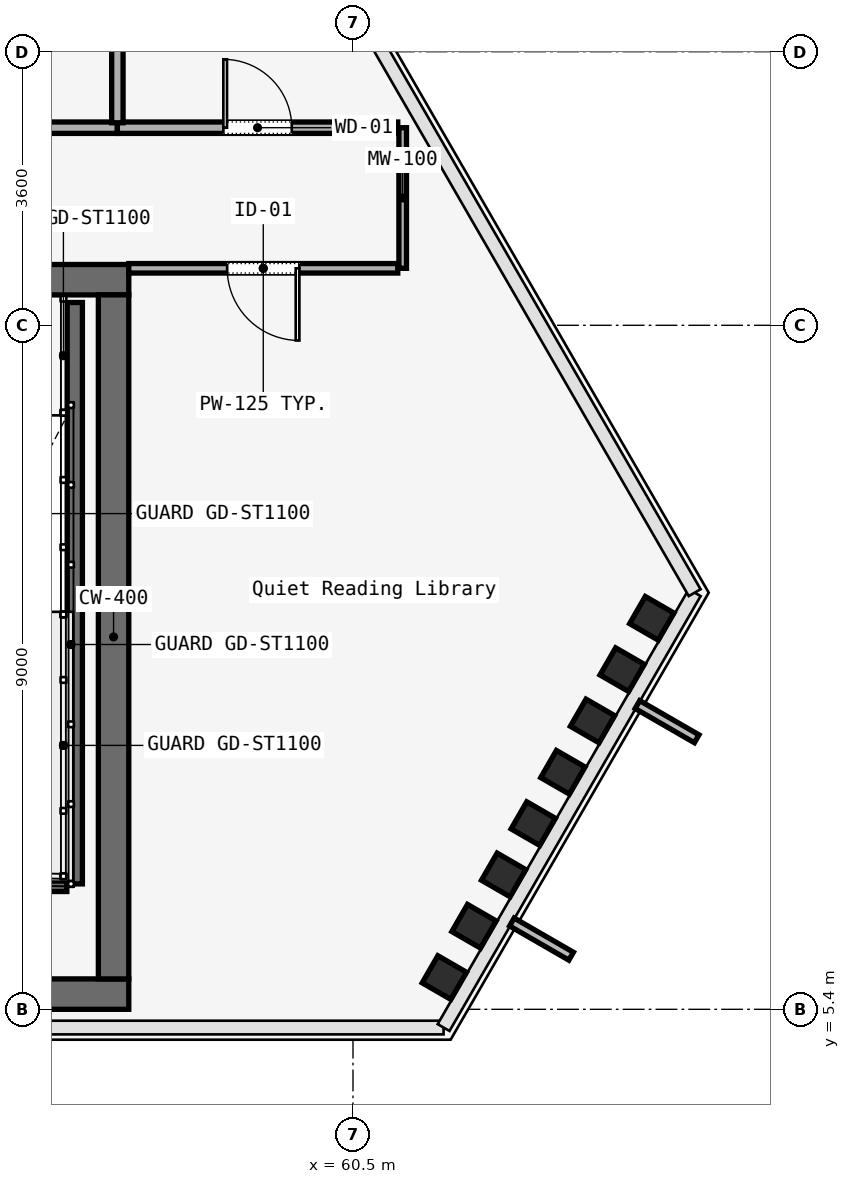
"""IFC4 building model, lengths in metres.
Left out: names, types, materials, properties, quantities, classifications, styles, units other than length and angle.
Written with IfcOpenShell. Run it as: python <this file> out.ifc"""

import sys

from ifc_helpers import new_model, si_unit, direction, frame, frame_2d, origin, origin_2d, place, context, subcontext, project, spatial, rectangle, i_section, extrude, element, fill, save


model = new_model("IFC4")
c1 = context("Model", 3, precision=1e-05, world=origin(), true_north=direction((0.0, 1.0)))
c2 = subcontext(c1, "Body", "Model", "MODEL_VIEW")
j1 = project(units=[si_unit("LENGTHUNIT", "METRE"), si_unit("PLANEANGLEUNIT", "RADIAN")], contexts=[c1])
p1 = place(None, origin())
s1 = spatial("IfcSite", under=j1, at=p1, CompositionType="ELEMENT")
p2 = place(p1, origin())
s2 = spatial("IfcBuilding", under=s1, at=p2, CompositionType="ELEMENT")
p3 = place(p2, frame((0.0, 0.0, 248.4)))
s3 = spatial("IfcBuildingStorey", under=s2, at=p3, CompositionType="ELEMENT", Elevation=248.4)
p4 = place(p3, frame((26.45, 15.0, 0.0), z_axis=(0.0, 0.0, 1.0), x_axis=(1.0, 0.0, 0.0)))
e1 = element("IfcWall", 1, at=p4, inside=s3, PredefinedType="SOLIDWALL", context=c2, shape_type="SweptSolid", body=[
    extrude(rectangle(XDim=31.1, YDim=0.4, at=frame_2d((15.55, 0.0))), origin(), (0.0, 0.0, 1.0), 3.58),
])
p5 = place(p4, frame((1.65, 0.0, 0.0)))
e2 = element("IfcOpeningElement", 2, at=p5, cuts=e1, PredefinedType="OPENING", context=c2, shape_type="SweptSolid", body=[
    extrude(rectangle(XDim=1.1, YDim=2.2, at=frame_2d((0.55, 1.1))), frame((0.0, 0.2, 0.0), z_axis=(0.0, -1.0, 0.0), x_axis=(1.0, 0.0, 0.0)), (0.0, 0.0, 1.0), 0.4),
])
p6 = place(p4, frame((13.65, 0.0, 0.0)))
e3 = element("IfcOpeningElement", 3, at=p6, cuts=e1, PredefinedType="OPENING", context=c2, shape_type="SweptSolid", body=[
    extrude(rectangle(XDim=1.1, YDim=2.2, at=frame_2d((0.55, 1.1))), frame((0.0, 0.2, 0.0), z_axis=(0.0, -1.0, 0.0), x_axis=(1.0, 0.0, 0.0)), (0.0, 0.0, 1.0), 0.4),
])
p7 = place(p4, frame((25.55, 0.0, 0.0)))
e4 = element("IfcOpeningElement", 4, at=p7, cuts=e1, PredefinedType="OPENING", context=c2, shape_type="SweptSolid", body=[
    extrude(rectangle(XDim=1.1, YDim=2.2, at=frame_2d((0.55, 1.1))), frame((0.0, 0.2, 0.0), z_axis=(0.0, -1.0, 0.0), x_axis=(1.0, 0.0, 0.0)), (0.0, 0.0, 1.0), 0.4),
])
p8 = place(p4, frame((19.35, 0.0, 0.0)))
e5 = element("IfcOpeningElement", 5, at=p8, cuts=e1, PredefinedType="OPENING", context=c2, shape_type="SweptSolid", body=[
    extrude(rectangle(XDim=1.1, YDim=2.2, at=frame_2d((0.55, 1.1))), frame((0.0, 0.2, 0.0), z_axis=(0.0, -1.0, 0.0), x_axis=(1.0, 0.0, 0.0)), (0.0, 0.0, 1.0), 0.4),
])
p9 = place(p4, frame((21.4, 0.0, 0.0)))
e6 = element("IfcOpeningElement", 6, at=p9, cuts=e1, PredefinedType="OPENING", context=c2, shape_type="SweptSolid", body=[
    extrude(rectangle(XDim=0.9, YDim=2.1, at=frame_2d((0.45, 1.05))), frame((0.0, 0.2, 0.0), z_axis=(0.0, -1.0, 0.0), x_axis=(1.0, 0.0, 0.0)), (0.0, 0.0, 1.0), 0.4),
])
p10 = place(p4, frame((5.14, 0.0, 0.0)))
e7 = element("IfcOpeningElement", 7, at=p10, cuts=e1, PredefinedType="OPENING", context=c2, shape_type="SweptSolid", body=[
    extrude(rectangle(XDim=0.95, YDim=2.2, at=frame_2d((0.475, 1.1))), frame((0.0, 0.2, 0.0), z_axis=(0.0, -1.0, 0.0), x_axis=(1.0, 0.0, 0.0)), (0.0, 0.0, 1.0), 0.4),
])
p11 = place(p4, frame((7.825, 0.0, 0.0)))
e8 = element("IfcOpeningElement", 8, at=p11, cuts=e1, PredefinedType="OPENING", context=c2, shape_type="SweptSolid", body=[
    extrude(rectangle(XDim=0.95, YDim=2.2, at=frame_2d((0.475, 1.1))), frame((0.0, 0.2, 0.0), z_axis=(0.0, -1.0, 0.0), x_axis=(1.0, 0.0, 0.0)), (0.0, 0.0, 1.0), 0.4),
])
p12 = place(p4, frame((10.46, 0.0, 0.0)))
e9 = element("IfcOpeningElement", 9, at=p12, cuts=e1, PredefinedType="OPENING", context=c2, shape_type="SweptSolid", body=[
    extrude(rectangle(XDim=0.95, YDim=2.2, at=frame_2d((0.475, 1.1))), frame((0.0, 0.2, 0.0), z_axis=(0.0, -1.0, 0.0), x_axis=(1.0, 0.0, 0.0)), (0.0, 0.0, 1.0), 0.4),
])
p13 = place(p4, frame((23.35, 0.0, 0.0)))
e10 = element("IfcOpeningElement", 10, at=p13, cuts=e1, PredefinedType="OPENING", context=c2, shape_type="SweptSolid", body=[
    extrude(rectangle(XDim=1.3, YDim=2.3, at=frame_2d((0.65, 1.15))), frame((0.0, 0.2, 0.0), z_axis=(0.0, -1.0, 0.0), x_axis=(1.0, 0.0, 0.0)), (0.0, 0.0, 1.0), 0.4),
])
p14 = place(p3, frame((26.45, 5.6, 0.0), z_axis=(0.0, 0.0, 1.0), x_axis=(1.0, 0.0, 0.0)))
e11 = element("IfcWall", 11, at=p14, inside=s3, PredefinedType="SOLIDWALL", context=c2, shape_type="SweptSolid", body=[
    extrude(rectangle(XDim=31.1, YDim=0.4, at=frame_2d((15.55, 0.0))), origin(), (0.0, 0.0, 1.0), 3.58),
])
p15 = place(p3, frame((57.35, 5.8, 0.0), z_axis=(0.0, 0.0, 1.0), x_axis=(0.0, 1.0, 0.0)))
e12 = element("IfcWall", 12, at=p15, inside=s3, PredefinedType="SOLIDWALL", context=c2, shape_type="SweptSolid", body=[
    extrude(rectangle(XDim=9.0, YDim=0.4, at=frame_2d((4.5, 0.0))), origin(), (0.0, 0.0, 1.0), 3.58),
])
p16 = place(p3, frame((61.702, 5.818, 0.0), z_axis=(0.025904104361, -0.008793761743, 0.999625753536), x_axis=(-0.659025814522, 0.751747105842, 0.023691024698)))
e13 = element("IfcColumn", 13, at=p16, inside=s3, PredefinedType="COLUMN", context=c2, shape_type="SweptSolid", body=[
    extrude(i_section(OverallWidth=0.412, OverallDepth=0.435, WebThickness=0.036, FlangeThickness=0.044, FilletRadius=0.015, at=origin_2d()), origin(), (0.0, 0.0, 1.0), 3.581),
])
p17 = place(p3, frame((62.092, 6.493, 0.0), z_axis=(0.015813602401, -0.026310562616, 0.99952873109), x_axis=(-0.017371185195, 0.999495625368, 0.02658452171)))
e14 = element("IfcColumn", 14, at=p17, inside=s3, PredefinedType="COLUMN", context=c2, shape_type="SweptSolid", body=[
    extrude(i_section(OverallWidth=0.412, OverallDepth=0.435, WebThickness=0.036, FlangeThickness=0.044, FilletRadius=0.015, at=origin_2d()), origin(), (0.0, 0.0, 1.0), 3.582),
])
p18 = place(p3, frame((62.482, 7.168, 0.0), z_axis=(0.005654596027, -0.043806087294, 0.999024049891), x_axis=(0.385125164829, 0.922071253543, 0.038251938581)))
e15 = element("IfcColumn", 15, at=p18, inside=s3, PredefinedType="COLUMN", context=c2, shape_type="SweptSolid", body=[
    extrude(i_section(OverallWidth=0.412, OverallDepth=0.435, WebThickness=0.036, FlangeThickness=0.044, FilletRadius=0.015, at=origin_2d()), origin(), (0.0, 0.0, 1.0), 3.583),
])
p19 = place(p3, frame((62.872, 7.844, 0.0), z_axis=(-0.004492319885, -0.061258907529, 0.998111800006), x_axis=(0.561879806224, 0.825506788185, 0.053194229172)))
e16 = element("IfcColumn", 16, at=p19, inside=s3, PredefinedType="COLUMN", context=c2, shape_type="SweptSolid", body=[
    extrude(i_section(OverallWidth=0.412, OverallDepth=0.435, WebThickness=0.036, FlangeThickness=0.044, FilletRadius=0.015, at=origin_2d()), origin(), (0.0, 0.0, 1.0), 3.587),
])
p20 = place(p3, frame((63.262, 8.519, 0.0), z_axis=(-0.014546809281, -0.078647936157, 0.996796314438), x_axis=(0.648665532767, 0.75791503215, 0.069266374537)))
e17 = element("IfcColumn", 17, at=p20, inside=s3, PredefinedType="COLUMN", context=c2, shape_type="SweptSolid", body=[
    extrude(i_section(OverallWidth=0.412, OverallDepth=0.435, WebThickness=0.036, FlangeThickness=0.044, FilletRadius=0.015, at=origin_2d()), origin(), (0.0, 0.0, 1.0), 3.592),
])
p21 = place(p3, frame((63.652, 9.194, 0.0), z_axis=(-0.024632735743, -0.095952309479, 0.995081093497), x_axis=(0.698578734935, 0.710371408541, 0.085791683883)))
e18 = element("IfcColumn", 18, at=p21, inside=s3, PredefinedType="COLUMN", context=c2, shape_type="SweptSolid", body=[
    extrude(i_section(OverallWidth=0.412, OverallDepth=0.435, WebThickness=0.036, FlangeThickness=0.044, FilletRadius=0.015, at=origin_2d()), origin(), (0.0, 0.0, 1.0), 3.598),
])
p22 = place(p3, frame((64.041, 9.869, 0.0), z_axis=(-0.03453480772, -0.113152281763, 0.9929772949), x_axis=(0.72925124523, 0.676532004026, 0.10245520416)))
e19 = element("IfcColumn", 19, at=p22, inside=s3, PredefinedType="COLUMN", context=c2, shape_type="SweptSolid", body=[
    extrude(i_section(OverallWidth=0.412, OverallDepth=0.435, WebThickness=0.036, FlangeThickness=0.044, FilletRadius=0.015, at=origin_2d()), origin(), (0.0, 0.0, 1.0), 3.605),
])
p23 = place(p3, frame((64.431, 10.544, 0.0), z_axis=(-0.044511969596, -0.130293762292, 0.990475754408), x_axis=(0.750456045838, 0.650074909775, 0.11924065979)))
e20 = element("IfcColumn", 20, at=p23, inside=s3, PredefinedType="COLUMN", context=c2, shape_type="SweptSolid", body=[
    extrude(i_section(OverallWidth=0.412, OverallDepth=0.435, WebThickness=0.036, FlangeThickness=0.044, FilletRadius=0.015, at=origin_2d()), origin(), (0.0, 0.0, 1.0), 3.615),
])
p24 = place(p3, frame((56.84, 14.7, 0.0), z_axis=(0.0, 0.0, 1.0), x_axis=(0.0, -1.0, 0.0)))
e21 = element("IfcWall", 21, at=p24, inside=s3, PredefinedType="SOLIDWALL", context=c2, shape_type="SweptSolid", body=[
    extrude(rectangle(XDim=7.65, YDim=0.2, at=frame_2d((3.825, 0.0))), origin(), (0.0, 0.0, 1.0), 3.8),
])
p25 = place(p3, frame((53.62, 7.05, 0.0), z_axis=(0.0, 0.0, 1.0), x_axis=(1.0, 0.0, 0.0)))
e22 = element("IfcWall", 22, at=p25, inside=s3, PredefinedType="SOLIDWALL", context=c2, shape_type="SweptSolid", body=[
    extrude(rectangle(XDim=3.115, YDim=0.2, at=frame_2d((1.558, 0.0))), origin(), (0.0, 0.0, 1.0), 3.8),
])
p26 = place(p3, frame((61.154, 17.0, 0.0), z_axis=(0.0, 0.0, 1.0), x_axis=(0.0, -1.0, 0.0)))
e23 = element("IfcWall", 23, at=p26, inside=s3, PredefinedType="MOVABLE", context=c2, shape_type="SweptSolid", body=[
    extrude(rectangle(XDim=1.85, YDim=0.1, at=frame_2d((0.925, 0.0))), origin(), (0.0, 0.0, 1.0), 3.01),
])
p27 = place(p3, frame((61.089, 15.15, 0.0), z_axis=(0.0, 0.0, 1.0), x_axis=(-1.0, 0.0, 0.0)))
e24 = element("IfcWall", 24, at=p27, inside=s3, PredefinedType="PARTITIONING", context=c2, shape_type="SweptSolid", body=[
    extrude(rectangle(XDim=3.539, YDim=0.125, at=frame_2d((1.77, 0.0))), origin(), (0.0, 0.0, 1.0), 3.01),
])
p28 = place(p27, frame((1.294, 0.0, 0.0)))
e25 = element("IfcOpeningElement", 25, at=p28, cuts=e24, PredefinedType="OPENING", context=c2, shape_type="SweptSolid", body=[
    extrude(rectangle(XDim=0.95, YDim=2.2, at=frame_2d((0.475, 1.1))), frame((0.0, 0.062, 0.0), z_axis=(0.0, -1.0, 0.0), x_axis=(1.0, 0.0, 0.0)), (0.0, 0.0, 1.0), 0.125),
])
p29 = place(p3, frame((52.8, 17.0, 0.0), z_axis=(0.0, 0.0, 1.0), x_axis=(1.0, 0.0, 0.0)))
e26 = element("IfcWall", 26, at=p29, inside=s3, PredefinedType="PARTITIONING", context=c2, shape_type="SweptSolid", body=[
    extrude(rectangle(XDim=4.6, YDim=0.15, at=frame_2d((2.3, 0.0))), origin(), (0.0, 0.0, 1.0), 3.01),
])
p30 = place(p29, frame((1.825, 0.0, 0.0)))
e27 = element("IfcOpeningElement", 27, at=p30, cuts=e26, PredefinedType="OPENING", context=c2, shape_type="SweptSolid", body=[
    extrude(rectangle(XDim=0.95, YDim=2.2, at=frame_2d((0.475, 1.1))), frame((0.0, 0.075, 0.0), z_axis=(0.0, -1.0, 0.0), x_axis=(1.0, 0.0, 0.0)), (0.0, 0.0, 1.0), 0.15),
])
p31 = place(p3, frame((57.4, 17.0, 0.0), z_axis=(0.0, 0.0, 1.0), x_axis=(1.0, 0.0, 0.0)))
e28 = element("IfcWall", 28, at=p31, inside=s3, PredefinedType="PARTITIONING", context=c2, shape_type="SweptSolid", body=[
    extrude(rectangle(XDim=3.689, YDim=0.15, at=frame_2d((1.845, 0.0))), origin(), (0.0, 0.0, 1.0), 3.01),
])
p32 = place(p31, frame((1.395, 0.0, 0.0)))
e29 = element("IfcOpeningElement", 29, at=p32, cuts=e28, PredefinedType="OPENING", context=c2, shape_type="SweptSolid", body=[
    extrude(rectangle(XDim=0.9, YDim=2.15, at=frame_2d((0.45, 1.075))), frame((0.0, 0.075, 0.0), z_axis=(0.0, -1.0, 0.0), x_axis=(1.0, 0.0, 0.0)), (0.0, 0.0, 1.0), 0.15),
])
p33 = place(p3, frame((57.4, 17.065, 0.0), z_axis=(0.0, 0.0, 1.0), x_axis=(0.0, 1.0, 0.0)))
e30 = element("IfcWall", 30, at=p33, inside=s3, PredefinedType="PARTITIONING", context=c2, shape_type="SweptSolid", body=[
    extrude(rectangle(XDim=6.973, YDim=0.15, at=frame_2d((3.487, 0.0))), origin(), (0.0, 0.0, 1.0), 3.01),
])
p34 = place(p28, origin())
e31 = element("IfcDoor", 31, at=p34, inside=s3, OperationType="SINGLE_SWING_RIGHT", PredefinedType="DOOR", context=c2, shape_type="SweptSolid", body=[
    extrude(rectangle(XDim=0.95, YDim=2.2, at=frame_2d((0.475, 1.1))), frame((0.0, 0.025, 0.0), z_axis=(0.0, -1.0, 0.0), x_axis=(1.0, 0.0, 0.0)), (0.0, 0.0, 1.0), 0.05),
])
fill(e25, e31)
p35 = place(p32, origin())
e32 = element("IfcDoor", 32, at=p35, inside=s3, OperationType="SINGLE_SWING_LEFT", PredefinedType="DOOR", context=c2, shape_type="SweptSolid", body=[
    extrude(rectangle(XDim=0.9, YDim=2.15, at=frame_2d((0.45, 1.075))), frame((0.0, 0.025, 0.0), z_axis=(0.0, -1.0, 0.0), x_axis=(1.0, 0.0, 0.0)), (0.0, 0.0, 1.0), 0.05),
])
fill(e29, e32)
save(model, sys.argv[1])
